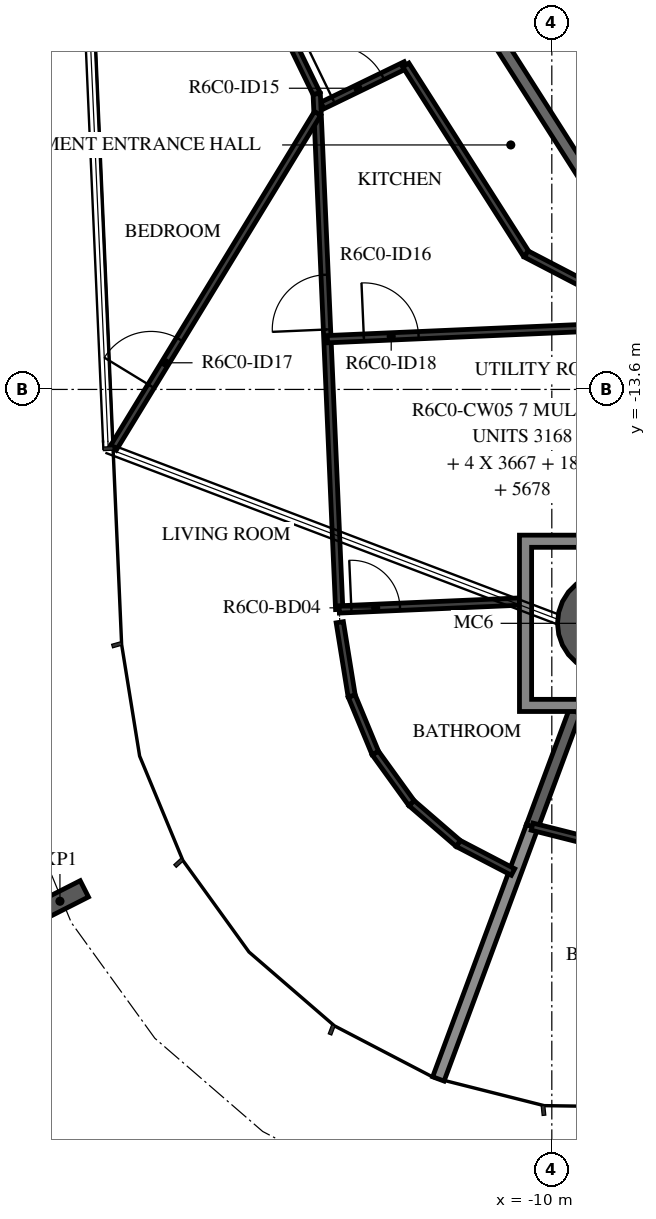
"""IFC4 building model, lengths in metres.
Left out: names, types, materials, properties, quantities, classifications, styles, units other than length and angle.
Written with IfcOpenShell. Run it as: python <this file> out.ifc"""

import sys

from ifc_helpers import new_model, si_unit, direction, frame, frame_2d, origin, origin_2d, place, context, subcontext, project, spatial, polyline, rectangle, hollow_circle, i_section, outline, extrude, element, fill, save


model = new_model("IFC4")
c1 = context("Model", 3, precision=1e-05, world=origin(), true_north=direction((0.0, 1.0)))
c2 = subcontext(c1, "Body", "Model", "MODEL_VIEW")
j1 = project(units=[si_unit("LENGTHUNIT", "METRE"), si_unit("PLANEANGLEUNIT", "RADIAN")], contexts=[c1])
p1 = place(None, origin())
s1 = spatial("IfcSite", under=j1, at=p1, CompositionType="ELEMENT")
p2 = place(p1, origin())
s2 = spatial("IfcBuilding", under=s1, at=p2, CompositionType="ELEMENT")
p3 = place(p2, frame((0.0, 0.0, 247.7)))
s3 = spatial("IfcBuildingStorey", under=s2, at=p3, CompositionType="ELEMENT", Elevation=247.7)
p4 = place(p3, frame((-9.082, -17.446, -0.38), z_axis=(0.0, 0.0, 1.0), x_axis=(1.0, 0.0, 0.0)))
e1 = element("IfcColumn", 1, at=p4, inside=s3, PredefinedType="COLUMN", context=c2, shape_type="SweptSolid", body=[
    extrude(hollow_circle(Radius=0.825, WallThickness=0.04, at=origin_2d()), origin(), (0.0, 0.0, 1.0), 3.5),
])
p5 = place(p3, frame((-18.089, -22.016, -0.38), z_axis=(0.0, 0.0, 1.0), x_axis=(-0.452473836659, 0.89177767809, 0.0)))
e2 = element("IfcColumn", 2, at=p5, inside=s3, PredefinedType="COLUMN", context=c2, shape_type="SweptSolid", body=[
    extrude(i_section(OverallWidth=0.3, OverallDepth=0.9, WebThickness=0.019, FlangeThickness=0.035, FilletRadius=0.03, at=origin_2d()), origin(), (0.0, 0.0, 1.0), 3.5),
])
p6 = place(p3, frame((-11.565, -6.786, 0.0), z_axis=(0.0, 0.0, 1.0), x_axis=(0.537297327359, -0.843392898958, 0.0)))
e3 = element("IfcWall", 3, at=p6, inside=s3, PredefinedType="STANDARD", context=c2, shape_type="SweptSolid", body=[
    extrude(rectangle(XDim=4.081, YDim=0.2, at=frame_2d((2.041, 0.0))), origin(), (0.0, 0.0, 1.0), 3.12),
])
p7 = place(p3, frame((-11.865, -24.939, 0.0), z_axis=(0.0, 0.0, 1.0), x_axis=(0.348214227297, 0.937414983829, 0.0)))
e4 = element("IfcWall", 4, at=p7, inside=s3, PredefinedType="STANDARD", context=c2, shape_type="SweptSolid", body=[
    extrude(rectangle(XDim=4.426, YDim=0.2, at=frame_2d((2.213, 0.0))), origin(), (0.0, 0.0, 1.0), 2.73),
])
p8 = place(p3, frame((-10.324, -20.79, 0.0), z_axis=(0.0, 0.0, 1.0), x_axis=(0.348313973933, 0.937377925686, 0.0)))
e5 = element("IfcWall", 5, at=p8, inside=s3, PredefinedType="STANDARD", context=c2, shape_type="SweptSolid", body=[
    extrude(rectangle(XDim=2.02, YDim=0.2, at=frame_2d((1.01, 0.0))), origin(), (0.0, 0.0, 1.0), 3.12),
])
p9 = place(p3, frame((-14.516, -7.402, 0.0), z_axis=(0.0, 0.0, 1.0), x_axis=(0.436676244377, -0.899618729016, 0.0)))
e6 = element("IfcWall", 6, at=p9, inside=s3, PredefinedType="PARTITIONING", context=c2, shape_type="SweptSolid", body=[
    extrude(rectangle(XDim=1.487, YDim=0.12, at=frame_2d((0.744, 0.0))), origin(), (0.0, 0.0, 1.0), 3.12),
])
p10 = place(p3, frame((-13.773, -8.931, 0.0), z_axis=(0.0, 0.0, 1.0), x_axis=(0.899585443678, 0.436744810527, 0.0)))
e7 = element("IfcWall", 7, at=p10, inside=s3, PredefinedType="PARTITIONING", context=c2, shape_type="SweptSolid", body=[
    extrude(rectangle(XDim=1.525, YDim=0.12, at=frame_2d((0.762, 0.0))), origin(), (0.0, 0.0, 1.0), 3.12),
])
p11 = place(p10, frame((0.2, 0.0, 0.0)))
e8 = element("IfcOpeningElement", 8, at=p11, cuts=e7, PredefinedType="OPENING", context=c2, shape_type="SweptSolid", body=[
    extrude(rectangle(XDim=0.9, YDim=2.1, at=frame_2d((0.45, 1.05))), frame((0.0, 0.07, 0.0), z_axis=(0.0, -1.0, 0.0), x_axis=(1.0, 0.0, 0.0)), (0.0, 0.0, 1.0), 0.14),
])
p12 = place(p3, frame((-12.402, -8.265, 0.0), z_axis=(0.0, 0.0, 1.0), x_axis=(0.537321213777, -0.843377681247, 0.0)))
e9 = element("IfcWall", 9, at=p12, inside=s3, PredefinedType="PARTITIONING", context=c2, shape_type="SweptSolid", body=[
    extrude(rectangle(XDim=3.685, YDim=0.12, at=frame_2d((1.843, 0.0))), origin(), (0.0, 0.0, 1.0), 3.12),
])
p13 = place(p3, frame((-10.421, -11.373, 0.0), z_axis=(0.0, 0.0, 1.0), x_axis=(0.887012970857, -0.461744506769, 0.0)))
e10 = element("IfcWall", 10, at=p13, inside=s3, PredefinedType="PARTITIONING", context=c2, shape_type="SweptSolid", body=[
    extrude(rectangle(XDim=7.985, YDim=0.12, at=frame_2d((3.992, 0.0))), origin(), (0.0, 0.0, 1.0), 3.12),
])
p14 = place(p13, frame((4.192, 0.0, 0.0)))
e11 = element("IfcOpeningElement", 11, at=p14, cuts=e10, PredefinedType="OPENING", context=c2, shape_type="SweptSolid", body=[
    extrude(rectangle(XDim=0.9, YDim=2.1, at=frame_2d((0.45, 1.05))), frame((0.0, 0.07, 0.0), z_axis=(0.0, -1.0, 0.0), x_axis=(1.0, 0.0, 0.0)), (0.0, 0.0, 1.0), 0.14),
])
p15 = place(p3, frame((-13.496, -17.218, 0.0), z_axis=(0.0, 0.0, 1.0), x_axis=(-0.043640714674, 0.999047290183, 0.0)))
e12 = element("IfcWall", 12, at=p15, inside=s3, PredefinedType="PARTITIONING", context=c2, shape_type="SweptSolid", body=[
    extrude(rectangle(XDim=8.487, YDim=0.12, at=frame_2d((4.243, 0.0))), origin(), (0.0, 0.0, 1.0), 3.12),
])
p16 = place(p15, frame((4.608, 0.0, 0.0)))
e13 = element("IfcOpeningElement", 13, at=p16, cuts=e12, PredefinedType="OPENING", context=c2, shape_type="SweptSolid", body=[
    extrude(rectangle(XDim=0.9, YDim=2.1, at=frame_2d((0.45, 1.05))), frame((0.0, 0.07, 0.0), z_axis=(0.0, -1.0, 0.0), x_axis=(1.0, 0.0, 0.0)), (0.0, 0.0, 1.0), 0.14),
])
p17 = place(p3, frame((-17.215, -14.57, 0.0), z_axis=(0.0, 0.0, 1.0), x_axis=(0.520949659667, 0.853587401555, 0.0)))
e14 = element("IfcWall", 14, at=p17, inside=s3, PredefinedType="PARTITIONING", context=c2, shape_type="SweptSolid", body=[
    extrude(rectangle(XDim=6.455, YDim=0.12, at=frame_2d((3.228, 0.0))), origin(), (0.0, 0.0, 1.0), 3.12),
])
p18 = place(p17, frame((1.2, 0.0, 0.0)))
e15 = element("IfcOpeningElement", 15, at=p18, cuts=e14, PredefinedType="OPENING", context=c2, shape_type="SweptSolid", body=[
    extrude(rectangle(XDim=0.9, YDim=2.1, at=frame_2d((0.45, 1.05))), frame((0.0, 0.07, 0.0), z_axis=(0.0, -1.0, 0.0), x_axis=(1.0, 0.0, 0.0)), (0.0, 0.0, 1.0), 0.14),
])
p19 = place(p3, frame((-13.69, -12.774, 0.0), z_axis=(0.0, 0.0, 1.0), x_axis=(0.999048778431, 0.043606631553, 0.0)))
e16 = element("IfcWall", 16, at=p19, inside=s3, PredefinedType="PARTITIONING", context=c2, shape_type="SweptSolid", body=[
    extrude(rectangle(XDim=5.503, YDim=0.12, at=frame_2d((2.752, 0.0))), origin(), (0.0, 0.0, 1.0), 3.12),
])
p20 = place(p19, frame((0.6, 0.0, 0.0)))
e17 = element("IfcOpeningElement", 17, at=p20, cuts=e16, PredefinedType="OPENING", context=c2, shape_type="SweptSolid", body=[
    extrude(rectangle(XDim=0.9, YDim=2.1, at=frame_2d((0.45, 1.05))), frame((0.0, 0.07, 0.0), z_axis=(0.0, -1.0, 0.0), x_axis=(1.0, 0.0, 0.0)), (0.0, 0.0, 1.0), 0.14),
])
for number, where, z_axis, x_axis in (
    (18, (-10.638, -21.536, 0.0), (0.0, 0.0, 1.0), (-0.887, 0.462, 0.0)),
    (19, (-11.539, -21.067, 0.0), (0.0, 0.0, 1.0), (-0.757, 0.654, 0.0)),
    (20, (-12.308, -20.402, 0.0), (0.0, 0.0, 1.0), (-0.585, 0.811, 0.0)),
):
    element("IfcWall", number, at=place(p3, frame(where, z_axis=z_axis, x_axis=x_axis)), inside=s3, PredefinedType="PARTITIONING", context=c2, shape_type="SweptSolid", body=[
        extrude(rectangle(XDim=1.016, YDim=0.12, at=frame_2d((0.508, 0.0))), origin(), (0.0, 0.0, 1.0), 3.12),
    ])
p21 = place(p3, frame((-12.903, -19.579, 0.0), z_axis=(0.0, 0.0, 1.0), x_axis=(-0.382754975976, 0.923849894932, 0.0)))
e21 = element("IfcWall", 21, at=p21, inside=s3, PredefinedType="PARTITIONING", context=c2, shape_type="SweptSolid", body=[
    extrude(rectangle(XDim=1.016, YDim=0.12, at=frame_2d((0.508, 0.0))), origin(), (0.0, 0.0, 1.0), 3.12),
])
p22 = place(p3, frame((-13.292, -18.64, 0.0), z_axis=(0.0, 0.0, 1.0), x_axis=(-0.159363796836, 0.98721992497, 0.0)))
e22 = element("IfcWall", 22, at=p22, inside=s3, PredefinedType="PARTITIONING", context=c2, shape_type="SweptSolid", body=[
    extrude(rectangle(XDim=1.227, YDim=0.12, at=frame_2d((0.614, 0.0))), origin(), (0.0, 0.0, 1.0), 3.12),
])
p23 = place(p3, frame((-13.496, -17.218, 0.0), z_axis=(0.0, 0.0, 1.0), x_axis=(0.999044946677, 0.043694330507, 0.0)))
e23 = element("IfcWall", 23, at=p23, inside=s3, PredefinedType="PARTITIONING", context=c2, shape_type="SweptSolid", body=[
    extrude(rectangle(XDim=2.967, YDim=0.12, at=frame_2d((1.483, 0.0))), origin(), (0.0, 0.0, 1.0), 3.12),
])
p24 = place(p23, frame((0.2, 0.0, 0.0)))
e24 = element("IfcOpeningElement", 24, at=p24, cuts=e23, PredefinedType="OPENING", context=c2, shape_type="SweptSolid", body=[
    extrude(rectangle(XDim=0.8, YDim=2.1, at=frame_2d((0.4, 1.05))), frame((0.0, 0.07, 0.0), z_axis=(0.0, -1.0, 0.0), x_axis=(1.0, 0.0, 0.0)), (0.0, 0.0, 1.0), 0.14),
])
p25 = place(p3, frame((-10.324, -20.79, 0.0), z_axis=(0.0, 0.0, 1.0), x_axis=(0.969547579982, -0.244903021933, 0.0)))
e25 = element("IfcWall", 25, at=p25, inside=s3, PredefinedType="PARTITIONING", context=c2, shape_type="SweptSolid", body=[
    extrude(rectangle(XDim=0.801, YDim=0.12, at=frame_2d((0.4, 0.0))), origin(), (0.0, 0.0, 1.0), 3.12),
])
p26 = place(p3, origin())
e26 = element("IfcWall", 26, at=p26, inside=s3, PredefinedType="STANDARD", context=c2, shape_type="SweptSolid", body=[
    extrude(outline(polyline([(-7.632, -15.996), (-7.632, -18.896), (-10.532, -18.896), (-10.532, -15.996), (-7.632, -15.996)]), holes=[polyline([(-10.332, -18.696), (-7.832, -18.696), (-7.832, -16.196), (-10.332, -16.196), (-10.332, -18.696)])]), origin(), (0.0, 0.0, 1.0), 3.12),
])
p27 = place(p11, origin())
e27 = element("IfcDoor", 27, at=p27, inside=s3, OperationType="SINGLE_SWING_LEFT", PredefinedType="DOOR", context=c2, shape_type="SweptSolid", body=[
    extrude(rectangle(XDim=0.9, YDim=2.1, at=frame_2d((0.45, 1.05))), frame((0.0, 0.025, 0.0), z_axis=(0.0, -1.0, 0.0), x_axis=(1.0, 0.0, 0.0)), (0.0, 0.0, 1.0), 0.05),
])
fill(e8, e27)
p28 = place(p16, origin())
e28 = element("IfcDoor", 28, at=p28, inside=s3, OperationType="SINGLE_SWING_RIGHT", PredefinedType="DOOR", context=c2, shape_type="SweptSolid", body=[
    extrude(rectangle(XDim=0.9, YDim=2.1, at=frame_2d((0.45, 1.05))), frame((0.0, 0.025, 0.0), z_axis=(0.0, -1.0, 0.0), x_axis=(1.0, 0.0, 0.0)), (0.0, 0.0, 1.0), 0.05),
])
fill(e13, e28)
p29 = place(p18, origin())
e29 = element("IfcDoor", 29, at=p29, inside=s3, OperationType="SINGLE_SWING_LEFT", PredefinedType="DOOR", context=c2, shape_type="SweptSolid", body=[
    extrude(rectangle(XDim=0.9, YDim=2.1, at=frame_2d((0.45, 1.05))), frame((0.0, 0.025, 0.0), z_axis=(0.0, -1.0, 0.0), x_axis=(1.0, 0.0, 0.0)), (0.0, 0.0, 1.0), 0.05),
])
fill(e15, e29)
p30 = place(p20, origin())
e30 = element("IfcDoor", 30, at=p30, inside=s3, OperationType="SINGLE_SWING_RIGHT", PredefinedType="DOOR", context=c2, shape_type="SweptSolid", body=[
    extrude(rectangle(XDim=0.9, YDim=2.1, at=frame_2d((0.45, 1.05))), frame((0.0, 0.025, 0.0), z_axis=(0.0, -1.0, 0.0), x_axis=(1.0, 0.0, 0.0)), (0.0, 0.0, 1.0), 0.05),
])
fill(e17, e30)
p31 = place(p24, origin())
e31 = element("IfcDoor", 31, at=p31, inside=s3, OperationType="SINGLE_SWING_RIGHT", PredefinedType="DOOR", context=c2, shape_type="SweptSolid", body=[
    extrude(rectangle(XDim=0.8, YDim=2.1, at=frame_2d((0.4, 1.05))), frame((0.0, 0.025, 0.0), z_axis=(0.0, -1.0, 0.0), x_axis=(1.0, 0.0, 0.0)), (0.0, 0.0, 1.0), 0.05),
])
fill(e24, e31)
save(model, sys.argv[1])
